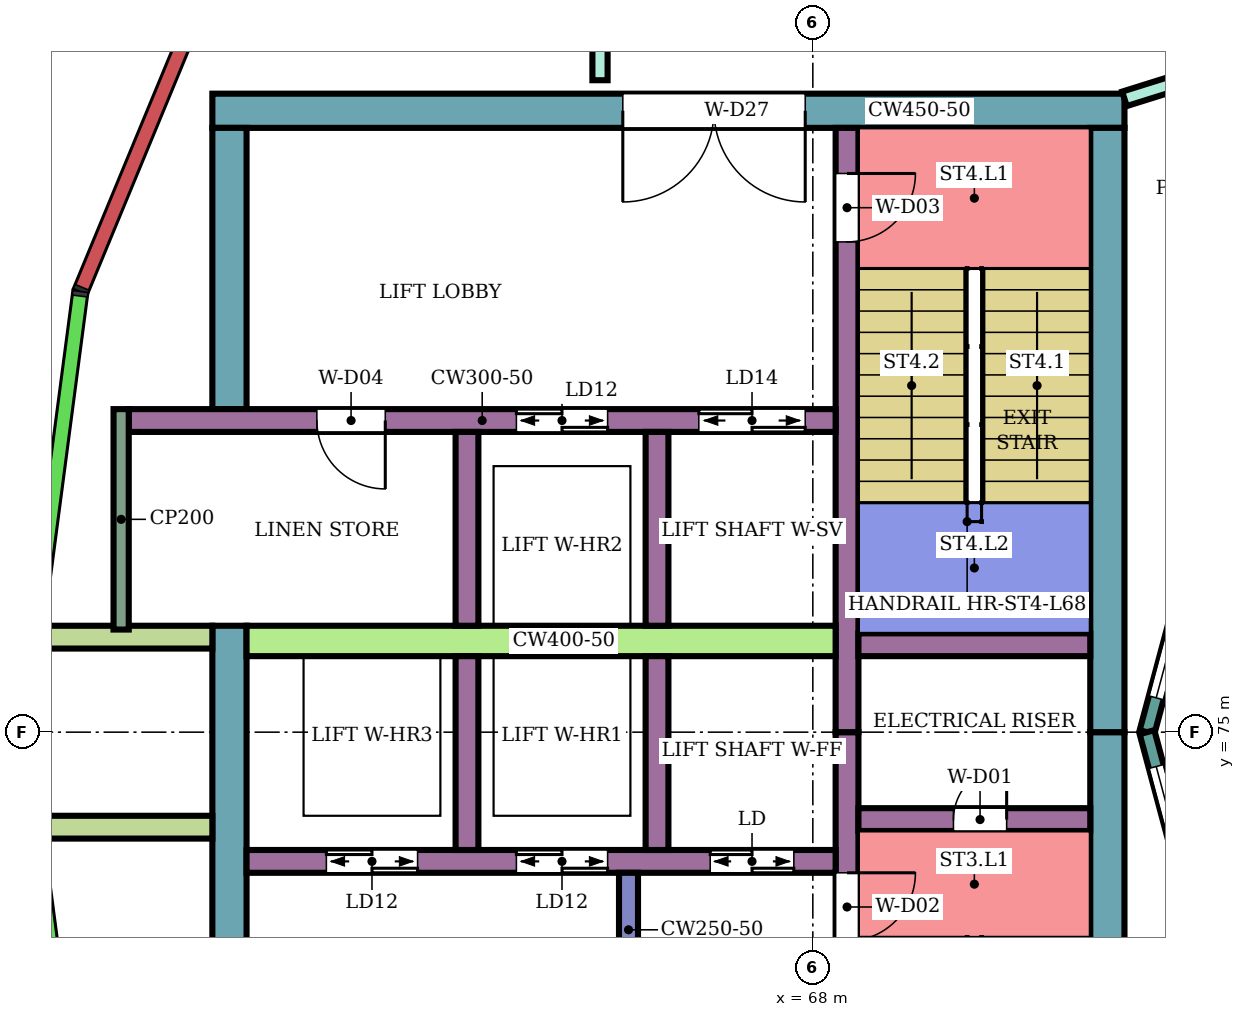
"""IFC4 building model, lengths in metres.
Left out: names, types, materials, properties, quantities, classifications, styles, units other than length and angle.
Written with IfcOpenShell. Run it as: python <this file> out.ifc"""

import sys

from ifc_helpers import new_model, si_unit, direction, frame, frame_2d, origin, place, context, subcontext, project, spatial, rectangle, extrude, element, fill, save


model = new_model("IFC4")
c1 = context("Model", 3, precision=1e-05, world=origin(), true_north=direction((0.0, 1.0)))
c2 = subcontext(c1, "Body", "Model", "MODEL_VIEW")
j1 = project(units=[si_unit("LENGTHUNIT", "METRE"), si_unit("PLANEANGLEUNIT", "RADIAN")], contexts=[c1])
p1 = place(None, origin())
s1 = spatial("IfcSite", under=j1, at=p1, CompositionType="ELEMENT")
p2 = place(p1, origin())
s2 = spatial("IfcBuilding", under=s1, at=p2, CompositionType="ELEMENT")
p3 = place(p2, frame((0.0, 0.0, 296.7)))
s3 = spatial("IfcBuildingStorey", under=s2, at=p3, CompositionType="ELEMENT", Elevation=296.7)
p4 = place(p3, frame((72.1, 83.175, 0.0), z_axis=(0.0, 0.0, 1.0), x_axis=(-1.0, 0.0, 0.0)))
e1 = element("IfcWall", 1, at=p4, inside=s3, PredefinedType="SHEAR", context=c2, shape_type="SweptSolid", body=[
    extrude(rectangle(XDim=12.0, YDim=0.45, at=frame_2d((6.0, 0.0))), origin(), (0.0, 0.0, 1.0), 3.88),
])
p5 = place(p4, frame((4.2, 0.0, 0.0)))
e2 = element("IfcOpeningElement", 2, at=p5, cuts=e1, PredefinedType="OPENING", context=c2, shape_type="SweptSolid", body=[
    extrude(rectangle(XDim=2.4, YDim=2.4, at=frame_2d((1.2, 1.2))), frame((0.0, 0.235, 0.0), z_axis=(0.0, -1.0, 0.0), x_axis=(1.0, 0.0, 0.0)), (0.0, 0.0, 1.0), 0.47),
])
for number, where, z_axis, x_axis in (
    (3, (71.875, 75.0, 0.0), (0.0, 0.0, 1.0), (0.0, -1.0, 0.0)),
    (4, (71.875, 82.95, 0.0), (0.0, 0.0, 1.0), (0.0, -1.0, 0.0)),
):
    element("IfcWall", number, at=place(p3, frame(where, z_axis=z_axis, x_axis=x_axis)), inside=s3, PredefinedType="SHEAR", context=c2, shape_type="SweptSolid", body=[
        extrude(rectangle(XDim=7.95, YDim=0.45, at=frame_2d((3.975, 0.0))), origin(), (0.0, 0.0, 1.0), 3.88),
    ])
p6 = place(p3, frame((60.325, 76.4, 0.0), z_axis=(0.0, 0.0, 1.0), x_axis=(0.0, -1.0, 0.0)))
e5 = element("IfcWall", 5, at=p6, inside=s3, PredefinedType="SHEAR", context=c2, shape_type="SweptSolid", body=[
    extrude(rectangle(XDim=9.35, YDim=0.45, at=frame_2d((4.675, 0.0))), origin(), (0.0, 0.0, 1.0), 3.88),
])
p7 = place(p3, frame((60.325, 82.95, 0.0), z_axis=(0.0, 0.0, 1.0), x_axis=(0.0, -1.0, 0.0)))
e6 = element("IfcWall", 6, at=p7, inside=s3, PredefinedType="SHEAR", context=c2, shape_type="SweptSolid", body=[
    extrude(rectangle(XDim=3.7, YDim=0.45, at=frame_2d((1.85, 0.0))), origin(), (0.0, 0.0, 1.0), 3.88),
])
p8 = place(p3, frame((68.45, 75.0, 0.0), z_axis=(0.0, 0.0, 1.0), x_axis=(0.0, -1.0, 0.0)))
e7 = element("IfcWall", 7, at=p8, inside=s3, PredefinedType="SHEAR", context=c2, shape_type="SweptSolid", body=[
    extrude(rectangle(XDim=7.95, YDim=0.3, at=frame_2d((3.975, 0.0))), origin(), (0.0, 0.0, 1.0), 3.88),
])
p9 = place(p8, frame((1.85, 0.0, 0.0)))
e8 = element("IfcOpeningElement", 8, at=p9, cuts=e7, PredefinedType="OPENING", context=c2, shape_type="SweptSolid", body=[
    extrude(rectangle(XDim=0.9, YDim=2.1, at=frame_2d((0.45, 1.05))), frame((0.0, 0.16, 0.0), z_axis=(0.0, -1.0, 0.0), x_axis=(1.0, 0.0, 0.0)), (0.0, 0.0, 1.0), 0.32),
])
p10 = place(p3, frame((68.45, 82.95, 0.0), z_axis=(0.0, 0.0, 1.0), x_axis=(0.0, -1.0, 0.0)))
e9 = element("IfcWall", 9, at=p10, inside=s3, PredefinedType="SHEAR", context=c2, shape_type="SweptSolid", body=[
    extrude(rectangle(XDim=7.95, YDim=0.3, at=frame_2d((3.975, 0.0))), origin(), (0.0, 0.0, 1.0), 3.88),
])
p11 = place(p10, frame((0.6, 0.0, 0.0)))
e10 = element("IfcOpeningElement", 10, at=p11, cuts=e9, PredefinedType="OPENING", context=c2, shape_type="SweptSolid", body=[
    extrude(rectangle(XDim=0.9, YDim=2.1, at=frame_2d((0.45, 1.05))), frame((0.0, 0.16, 0.0), z_axis=(0.0, -1.0, 0.0), x_axis=(1.0, 0.0, 0.0)), (0.0, 0.0, 1.0), 0.32),
])
p12 = place(p3, frame((71.65, 73.85, 0.0), z_axis=(0.0, 0.0, 1.0), x_axis=(-1.0, 0.0, 0.0)))
e11 = element("IfcWall", 11, at=p12, inside=s3, PredefinedType="SHEAR", context=c2, shape_type="SweptSolid", body=[
    extrude(rectangle(XDim=3.05, YDim=0.3, at=frame_2d((1.525, 0.0))), origin(), (0.0, 0.0, 1.0), 3.88),
])
p13 = place(p12, frame((1.1, 0.0, 0.0)))
e12 = element("IfcOpeningElement", 12, at=p13, cuts=e11, PredefinedType="OPENING", context=c2, shape_type="SweptSolid", body=[
    extrude(rectangle(XDim=0.7, YDim=2.0, at=frame_2d((0.35, 1.0))), frame((0.0, 0.16, 0.0), z_axis=(0.0, -1.0, 0.0), x_axis=(1.0, 0.0, 0.0)), (0.0, 0.0, 1.0), 0.32),
])
p14 = place(p3, frame((71.65, 76.15, 0.0), z_axis=(0.0, 0.0, 1.0), x_axis=(-1.0, 0.0, 0.0)))
e13 = element("IfcWall", 13, at=p14, inside=s3, PredefinedType="SHEAR", context=c2, shape_type="SweptSolid", body=[
    extrude(rectangle(XDim=3.05, YDim=0.3, at=frame_2d((1.525, 0.0))), origin(), (0.0, 0.0, 1.0), 3.88),
])
p15 = place(p3, frame((68.3, 73.3, 0.0), z_axis=(0.0, 0.0, 1.0), x_axis=(-1.0, 0.0, 0.0)))
e14 = element("IfcWall", 14, at=p15, inside=s3, PredefinedType="SHEAR", context=c2, shape_type="SweptSolid", body=[
    extrude(rectangle(XDim=7.75, YDim=0.3, at=frame_2d((3.875, 0.0))), origin(), (0.0, 0.0, 1.0), 3.88),
])
p16 = place(p15, frame((0.55, 0.0, 0.0)))
e15 = element("IfcOpeningElement", 15, at=p16, cuts=e14, PredefinedType="OPENING", context=c2, shape_type="SweptSolid", body=[
    extrude(rectangle(XDim=1.1, YDim=2.1, at=frame_2d((0.55, 1.05))), frame((0.0, 0.16, 0.0), z_axis=(0.0, -1.0, 0.0), x_axis=(1.0, 0.0, 0.0)), (0.0, 0.0, 1.0), 0.32),
])
p17 = place(p15, frame((3.0, 0.0, 0.0)))
e16 = element("IfcOpeningElement", 16, at=p17, cuts=e14, PredefinedType="OPENING", context=c2, shape_type="SweptSolid", body=[
    extrude(rectangle(XDim=1.2, YDim=2.1, at=frame_2d((0.6, 1.05))), frame((0.0, 0.16, 0.0), z_axis=(0.0, -1.0, 0.0), x_axis=(1.0, 0.0, 0.0)), (0.0, 0.0, 1.0), 0.32),
])
p18 = place(p15, frame((5.5, 0.0, 0.0)))
e17 = element("IfcOpeningElement", 17, at=p18, cuts=e14, PredefinedType="OPENING", context=c2, shape_type="SweptSolid", body=[
    extrude(rectangle(XDim=1.2, YDim=2.1, at=frame_2d((0.6, 1.05))), frame((0.0, 0.16, 0.0), z_axis=(0.0, -1.0, 0.0), x_axis=(1.0, 0.0, 0.0)), (0.0, 0.0, 1.0), 0.32),
])
p19 = place(p3, frame((68.3, 76.2, 0.0), z_axis=(0.0, 0.0, 1.0), x_axis=(-1.0, 0.0, 0.0)))
e18 = element("IfcWall", 18, at=p19, inside=s3, PredefinedType="SHEAR", context=c2, shape_type="SweptSolid", body=[
    extrude(rectangle(XDim=7.75, YDim=0.4, at=frame_2d((3.875, 0.0))), origin(), (0.0, 0.0, 1.0), 3.88),
])
p20 = place(p3, frame((68.3, 79.1, 0.0), z_axis=(0.0, 0.0, 1.0), x_axis=(-1.0, 0.0, 0.0)))
e19 = element("IfcWall", 19, at=p20, inside=s3, PredefinedType="SHEAR", context=c2, shape_type="SweptSolid", body=[
    extrude(rectangle(XDim=9.3, YDim=0.3, at=frame_2d((4.65, 0.0))), origin(), (0.0, 0.0, 1.0), 3.88),
])
p21 = place(p20, frame((0.4, 0.0, 0.0)))
e20 = element("IfcOpeningElement", 20, at=p21, cuts=e19, PredefinedType="OPENING", context=c2, shape_type="SweptSolid", body=[
    extrude(rectangle(XDim=1.4, YDim=2.1, at=frame_2d((0.7, 1.05))), frame((0.0, 0.16, 0.0), z_axis=(0.0, -1.0, 0.0), x_axis=(1.0, 0.0, 0.0)), (0.0, 0.0, 1.0), 0.32),
])
p22 = place(p20, frame((3.0, 0.0, 0.0)))
e21 = element("IfcOpeningElement", 21, at=p22, cuts=e19, PredefinedType="OPENING", context=c2, shape_type="SweptSolid", body=[
    extrude(rectangle(XDim=1.2, YDim=2.1, at=frame_2d((0.6, 1.05))), frame((0.0, 0.16, 0.0), z_axis=(0.0, -1.0, 0.0), x_axis=(1.0, 0.0, 0.0)), (0.0, 0.0, 1.0), 0.32),
])
p23 = place(p20, frame((5.925, 0.0, 0.0)))
e22 = element("IfcOpeningElement", 22, at=p23, cuts=e19, PredefinedType="OPENING", context=c2, shape_type="SweptSolid", body=[
    extrude(rectangle(XDim=0.9, YDim=2.1, at=frame_2d((0.45, 1.05))), frame((0.0, 0.16, 0.0), z_axis=(0.0, -1.0, 0.0), x_axis=(1.0, 0.0, 0.0)), (0.0, 0.0, 1.0), 0.32),
])
for number, where, z_axis, x_axis in (
    (23, (65.95, 76.0, 0.0), (0.0, 0.0, 1.0), (0.0, -1.0, 0.0)),
    (24, (63.45, 76.0, 0.0), (0.0, 0.0, 1.0), (0.0, -1.0, 0.0)),
    (25, (65.95, 78.95, 0.0), (0.0, 0.0, 1.0), (0.0, -1.0, 0.0)),
    (26, (63.45, 78.95, 0.0), (0.0, 0.0, 1.0), (0.0, -1.0, 0.0)),
):
    element("IfcWall", number, at=place(p3, frame(where, z_axis=z_axis, x_axis=x_axis)), inside=s3, PredefinedType="SHEAR", context=c2, shape_type="SweptSolid", body=[
        extrude(rectangle(XDim=2.55, YDim=0.3, at=frame_2d((1.275, 0.0))), origin(), (0.0, 0.0, 1.0), 3.88),
    ])
p24 = place(p3, frame((65.575, 73.15, 0.0), z_axis=(0.0, 0.0, 1.0), x_axis=(0.0, -1.0, 0.0)))
e27 = element("IfcWall", 27, at=p24, inside=s3, PredefinedType="SHEAR", context=c2, shape_type="SweptSolid", body=[
    extrude(rectangle(XDim=1.5, YDim=0.25, at=frame_2d((0.75, 0.0))), origin(), (0.0, 0.0, 1.0), 3.88),
])
for number, where, z_axis, x_axis in (
    (28, (60.1, 76.25, 0.0), (0.0, 0.0, 1.0), (-1.0, 0.0, 0.0)),
    (29, (60.1, 73.75, 0.0), (0.0, 0.0, 1.0), (-1.0, 0.0, 0.0)),
):
    element("IfcWall", number, at=place(p3, frame(where, z_axis=z_axis, x_axis=x_axis)), inside=s3, PredefinedType="NOTDEFINED", context=c2, shape_type="SweptSolid", body=[
        extrude(rectangle(XDim=2.416, YDim=0.3, at=frame_2d((1.208, 0.0))), origin(), (0.0, 0.0, 1.0), 4.2),
    ])
p25 = place(p3, frame((73.415, 78.802, 0.0), z_axis=(0.0, 0.0, 1.0), x_axis=(-0.258789828301, -0.965933654434, 0.0)))
e30 = element("IfcWall", 30, at=p25, inside=s3, PredefinedType="NOTDEFINED", context=c2, shape_type="SweptSolid", body=[
    extrude(rectangle(XDim=3.936, YDim=0.2, at=frame_2d((1.968, 0.0))), origin(), (0.0, 0.0, 1.0), 4.2),
])
p26 = place(p25, frame((0.468, 0.0, 0.9)))
e31 = element("IfcOpeningElement", 31, at=p26, cuts=e30, PredefinedType="OPENING", context=c2, shape_type="SweptSolid", body=[
    extrude(rectangle(XDim=3.0, YDim=2.3, at=frame_2d((1.5, 1.15))), frame((0.0, 0.11, 0.0), z_axis=(0.0, -1.0, 0.0), x_axis=(1.0, 0.0, 0.0)), (0.0, 0.0, 1.0), 0.22),
])
p27 = place(p3, frame((72.396, 75.0, 0.0), z_axis=(0.0, 0.0, 1.0), x_axis=(0.258789828301, -0.965933654434, 0.0)))
e32 = element("IfcWall", 32, at=p27, inside=s3, PredefinedType="NOTDEFINED", context=c2, shape_type="SweptSolid", body=[
    extrude(rectangle(XDim=3.936, YDim=0.2, at=frame_2d((1.968, 0.0))), origin(), (0.0, 0.0, 1.0), 4.2),
])
p28 = place(p27, frame((0.468, 0.0, 0.9)))
e33 = element("IfcOpeningElement", 33, at=p28, cuts=e32, PredefinedType="OPENING", context=c2, shape_type="SweptSolid", body=[
    extrude(rectangle(XDim=3.0, YDim=2.3, at=frame_2d((1.5, 1.15))), frame((0.0, 0.11, 0.0), z_axis=(0.0, -1.0, 0.0), x_axis=(1.0, 0.0, 0.0)), (0.0, 0.0, 1.0), 0.22),
])
p29 = place(p3, frame((65.2, 83.577, 0.0), z_axis=(0.0, 0.0, 1.0), x_axis=(0.0, 1.0, 0.0)))
e34 = element("IfcWall", 34, at=p29, inside=s3, PredefinedType="PARTITIONING", context=c2, shape_type="SweptSolid", body=[
    extrude(rectangle(XDim=1.223, YDim=0.2, at=frame_2d((0.612, 0.0))), origin(), (0.0, 0.0, 1.0), 3.75),
])
p30 = place(p3, frame((72.1, 83.332, 0.0), z_axis=(0.0, 0.0, 1.0), x_axis=(0.954233106619, 0.299063836383, 0.0)))
e35 = element("IfcWall", 35, at=p30, inside=s3, PredefinedType="PARTITIONING", context=c2, shape_type="SweptSolid", body=[
    extrude(rectangle(XDim=2.414, YDim=0.2, at=frame_2d((1.207, 0.0))), origin(), (0.0, 0.0, 1.0), 3.75),
])
p31 = place(p30, frame((0.762, 0.0, 0.0)))
e36 = element("IfcOpeningElement", 36, at=p31, cuts=e35, PredefinedType="OPENING", context=c2, shape_type="SweptSolid", body=[
    extrude(rectangle(XDim=0.9, YDim=2.1, at=frame_2d((0.45, 1.05))), frame((0.0, 0.11, 0.0), z_axis=(0.0, -1.0, 0.0), x_axis=(1.0, 0.0, 0.0)), (0.0, 0.0, 1.0), 0.22),
])
p32 = place(p3, frame((58.9, 79.25, 0.0), z_axis=(0.0, 0.0, 1.0), x_axis=(0.0, -1.0, 0.0)))
e37 = element("IfcWall", 37, at=p32, inside=s3, PredefinedType="PARTITIONING", context=c2, shape_type="SweptSolid", body=[
    extrude(rectangle(XDim=2.9, YDim=0.2, at=frame_2d((1.45, 0.0))), origin(), (0.0, 0.0, 1.0), 3.88),
])
p33 = place(p26, origin())
e38 = element("IfcWindow", 38, at=p33, inside=s3, PartitioningType="SINGLE_PANEL", PredefinedType="WINDOW", context=c2, shape_type="SweptSolid", body=[
    extrude(rectangle(XDim=3.0, YDim=2.3, at=frame_2d((1.5, 1.15))), frame((0.0, 0.03, 0.0), z_axis=(0.0, -1.0, 0.0), x_axis=(1.0, 0.0, 0.0)), (0.0, 0.0, 1.0), 0.06),
])
fill(e31, e38)
p34 = place(p28, origin())
e39 = element("IfcWindow", 39, at=p34, inside=s3, PartitioningType="SINGLE_PANEL", PredefinedType="WINDOW", context=c2, shape_type="SweptSolid", body=[
    extrude(rectangle(XDim=3.0, YDim=2.3, at=frame_2d((1.5, 1.15))), frame((0.0, 0.03, 0.0), z_axis=(0.0, -1.0, 0.0), x_axis=(1.0, 0.0, 0.0)), (0.0, 0.0, 1.0), 0.06),
])
fill(e33, e39)
p35 = place(p13, frame((0.7, 0.0, 0.0), z_axis=(0.0, 0.0, 1.0), x_axis=(-1.0, 0.0, 0.0)))
e40 = element("IfcDoor", 40, at=p35, inside=s3, OperationType="SINGLE_SWING_RIGHT", PredefinedType="DOOR", context=c2, shape_type="SweptSolid", body=[
    extrude(rectangle(XDim=0.7, YDim=2.0, at=frame_2d((0.35, 1.0))), frame((0.0, 0.025, 0.0), z_axis=(0.0, -1.0, 0.0), x_axis=(1.0, 0.0, 0.0)), (0.0, 0.0, 1.0), 0.05),
])
fill(e12, e40)
p36 = place(p9, origin())
e41 = element("IfcDoor", 41, at=p36, inside=s3, OperationType="SINGLE_SWING_LEFT", PredefinedType="DOOR", context=c2, shape_type="SweptSolid", body=[
    extrude(rectangle(XDim=0.9, YDim=2.1, at=frame_2d((0.45, 1.05))), frame((0.0, 0.025, 0.0), z_axis=(0.0, -1.0, 0.0), x_axis=(1.0, 0.0, 0.0)), (0.0, 0.0, 1.0), 0.05),
])
fill(e8, e41)
p37 = place(p11, origin())
e42 = element("IfcDoor", 42, at=p37, inside=s3, OperationType="SINGLE_SWING_LEFT", PredefinedType="DOOR", context=c2, shape_type="SweptSolid", body=[
    extrude(rectangle(XDim=0.9, YDim=2.1, at=frame_2d((0.45, 1.05))), frame((0.0, 0.025, 0.0), z_axis=(0.0, -1.0, 0.0), x_axis=(1.0, 0.0, 0.0)), (0.0, 0.0, 1.0), 0.05),
])
fill(e10, e42)
p38 = place(p16, origin())
e43 = element("IfcDoor", 43, at=p38, inside=s3, OperationType="DOUBLE_DOOR_SLIDING", PredefinedType="DOOR", context=c2, shape_type="SweptSolid", body=[
    extrude(rectangle(XDim=1.1, YDim=2.1, at=frame_2d((0.55, 1.05))), frame((0.0, 0.025, 0.0), z_axis=(0.0, -1.0, 0.0), x_axis=(1.0, 0.0, 0.0)), (0.0, 0.0, 1.0), 0.05),
])
fill(e15, e43)
p39 = place(p17, origin())
e44 = element("IfcDoor", 44, at=p39, inside=s3, OperationType="DOUBLE_DOOR_SLIDING", PredefinedType="DOOR", context=c2, shape_type="SweptSolid", body=[
    extrude(rectangle(XDim=1.2, YDim=2.1, at=frame_2d((0.6, 1.05))), frame((0.0, 0.025, 0.0), z_axis=(0.0, -1.0, 0.0), x_axis=(1.0, 0.0, 0.0)), (0.0, 0.0, 1.0), 0.05),
])
fill(e16, e44)
p40 = place(p18, origin())
e45 = element("IfcDoor", 45, at=p40, inside=s3, OperationType="DOUBLE_DOOR_SLIDING", PredefinedType="DOOR", context=c2, shape_type="SweptSolid", body=[
    extrude(rectangle(XDim=1.2, YDim=2.1, at=frame_2d((0.6, 1.05))), frame((0.0, 0.025, 0.0), z_axis=(0.0, -1.0, 0.0), x_axis=(1.0, 0.0, 0.0)), (0.0, 0.0, 1.0), 0.05),
])
fill(e17, e45)
p41 = place(p21, origin())
e46 = element("IfcDoor", 46, at=p41, inside=s3, OperationType="DOUBLE_DOOR_SLIDING", PredefinedType="DOOR", context=c2, shape_type="SweptSolid", body=[
    extrude(rectangle(XDim=1.4, YDim=2.1, at=frame_2d((0.7, 1.05))), frame((0.0, 0.025, 0.0), z_axis=(0.0, -1.0, 0.0), x_axis=(1.0, 0.0, 0.0)), (0.0, 0.0, 1.0), 0.05),
])
fill(e20, e46)
p42 = place(p22, origin())
e47 = element("IfcDoor", 47, at=p42, inside=s3, OperationType="DOUBLE_DOOR_SLIDING", PredefinedType="DOOR", context=c2, shape_type="SweptSolid", body=[
    extrude(rectangle(XDim=1.2, YDim=2.1, at=frame_2d((0.6, 1.05))), frame((0.0, 0.025, 0.0), z_axis=(0.0, -1.0, 0.0), x_axis=(1.0, 0.0, 0.0)), (0.0, 0.0, 1.0), 0.05),
])
fill(e21, e47)
p43 = place(p23, origin())
e48 = element("IfcDoor", 48, at=p43, inside=s3, OperationType="SINGLE_SWING_LEFT", PredefinedType="DOOR", context=c2, shape_type="SweptSolid", body=[
    extrude(rectangle(XDim=0.9, YDim=2.1, at=frame_2d((0.45, 1.05))), frame((0.0, 0.025, 0.0), z_axis=(0.0, -1.0, 0.0), x_axis=(1.0, 0.0, 0.0)), (0.0, 0.0, 1.0), 0.05),
])
fill(e22, e48)
p44 = place(p5, origin())
e49 = element("IfcDoor", 49, at=p44, inside=s3, OperationType="DOUBLE_DOOR_SINGLE_SWING", PredefinedType="DOOR", context=c2, shape_type="SweptSolid", body=[
    extrude(rectangle(XDim=2.4, YDim=2.4, at=frame_2d((1.2, 1.2))), frame((0.0, 0.025, 0.0), z_axis=(0.0, -1.0, 0.0), x_axis=(1.0, 0.0, 0.0)), (0.0, 0.0, 1.0), 0.05),
])
fill(e2, e49)
save(model, sys.argv[1])
